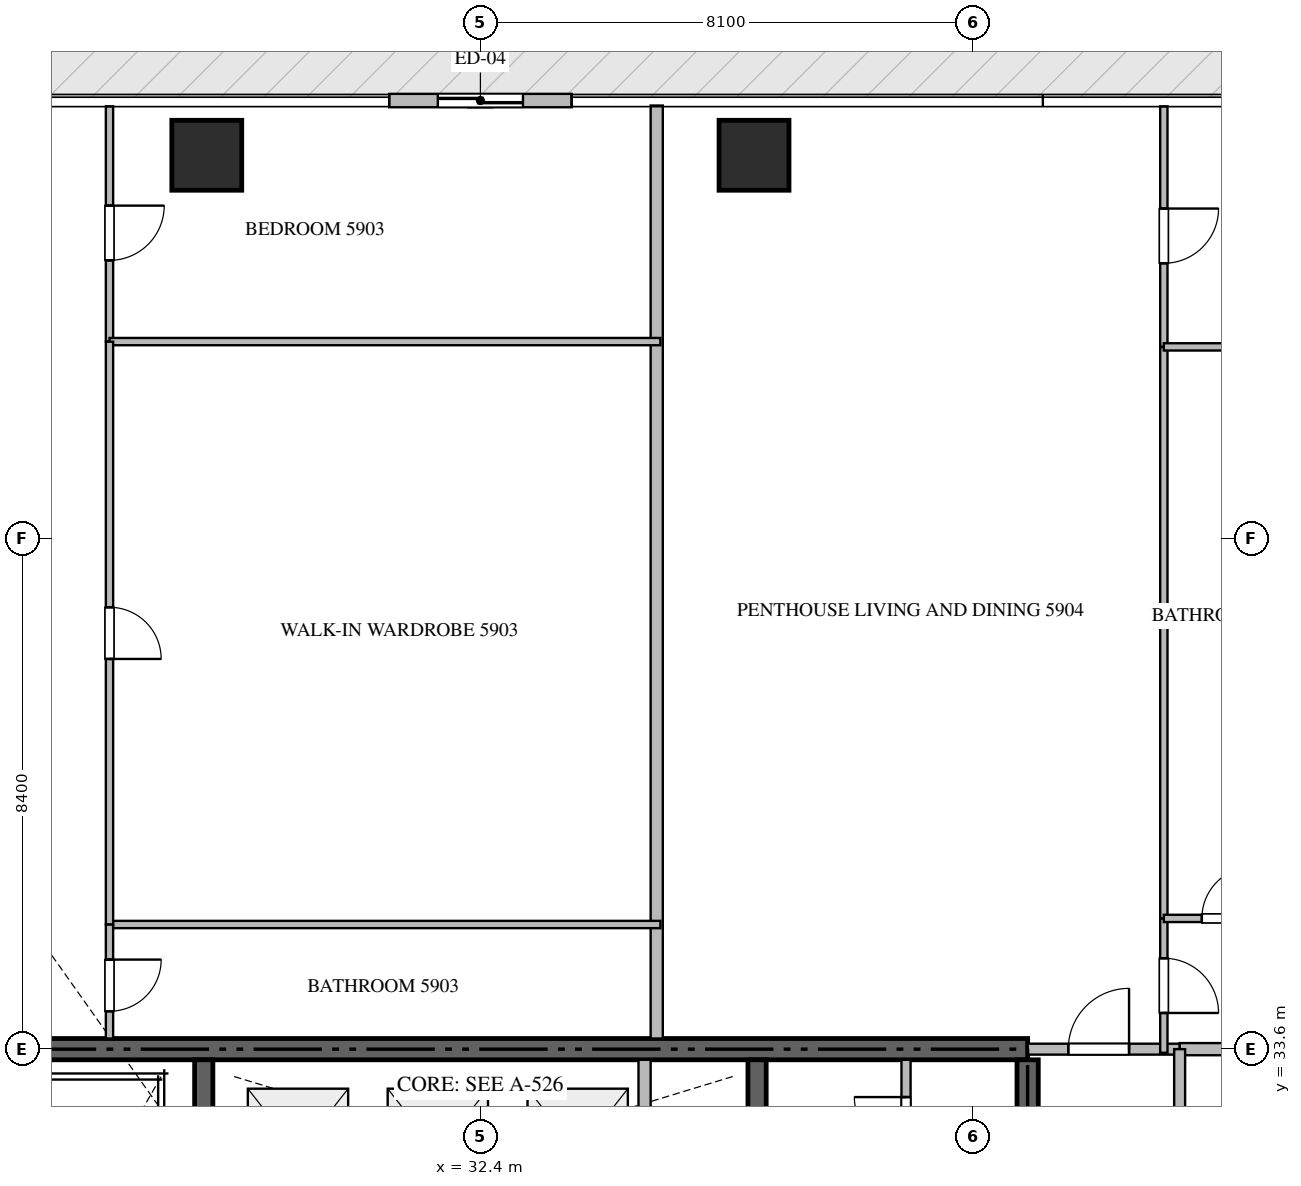
"""IFC4 building model, lengths in metres.
Left out: names, types, materials, properties, quantities, classifications, styles, units other than length and angle.
Written with IfcOpenShell. Run it as: python <this file> out.ifc"""

import sys

from ifc_helpers import new_model, si_unit, direction, frame, frame_2d, origin, origin_2d, place, context, subcontext, project, spatial, rectangle, extrude, source, transform, mapped, element, fill, save


model = new_model("IFC4")
c1 = context("Model", 3, precision=1e-05, world=origin(), true_north=direction((0.0, 1.0)))
c2 = subcontext(c1, "Body", "Model", "MODEL_VIEW")
j1 = project(units=[si_unit("LENGTHUNIT", "METRE"), si_unit("PLANEANGLEUNIT", "RADIAN")], contexts=[c1])
p1 = place(None, origin())
s1 = spatial("IfcSite", under=j1, at=p1, CompositionType="ELEMENT")
p2 = place(p1, origin())
s2 = spatial("IfcBuilding", under=s1, at=p2, CompositionType="ELEMENT")
p3 = place(p2, frame((0.0, 0.0, 237.4)))
s3 = spatial("IfcBuildingStorey", under=s2, at=p3, CompositionType="ELEMENT", Elevation=237.4)
p4 = place(p3, frame((41.4, 33.6, -0.26), z_axis=(0.0, 0.0, 1.0), x_axis=(-1.0, 0.0, 0.0)))
e1 = element("IfcWall", 1, at=p4, inside=s3, PredefinedType="SHEAR", context=c2, shape_type="SweptSolid", body=[
    extrude(rectangle(XDim=18.0, YDim=0.35, at=frame_2d((9.0, 0.0))), origin(), (0.0, 0.0, 1.0), 3.848),
])
p5 = place(p3, frame((41.4, 27.75, -0.26), z_axis=(0.0, 0.0, 1.0), x_axis=(0.0, 1.0, 0.0)))
e2 = element("IfcWall", 2, at=p5, inside=s3, PredefinedType="SHEAR", context=c2, shape_type="SweptSolid", body=[
    extrude(rectangle(XDim=5.675, YDim=0.35, at=frame_2d((2.837, 0.0))), origin(), (0.0, 0.0, 1.0), 3.848),
])
p6 = place(p3, frame((27.85, 23.55, -0.26), z_axis=(0.0, 0.0, 1.0), x_axis=(0.0, 1.0, 0.0)))
e3 = element("IfcWall", 3, at=p6, inside=s3, PredefinedType="SHEAR", context=c2, shape_type="SweptSolid", body=[
    extrude(rectangle(XDim=9.875, YDim=0.3, at=frame_2d((4.938, 0.0))), origin(), (0.0, 0.0, 1.0), 3.848),
])
p7 = place(p3, frame((36.95, 27.05, -0.26), z_axis=(0.0, 0.0, 1.0), x_axis=(0.0, 1.0, 0.0)))
e4 = element("IfcWall", 4, at=p7, inside=s3, PredefinedType="SHEAR", context=c2, shape_type="SweptSolid", body=[
    extrude(rectangle(XDim=6.375, YDim=0.3, at=frame_2d((3.188, 0.0))), origin(), (0.0, 0.0, 1.0), 3.848),
])
m1 = source(origin(), c2, "Body", "SweptSolid", [
    extrude(rectangle(XDim=1.15, YDim=1.15, at=origin_2d()), origin(), (0.0, 0.0, 1.0), 3.85),
])
for number, where, z_axis, x_axis in (
    (5, (27.9, 48.3, -0.26), (0.0, 0.0, 1.0), (1.0, 0.0, 0.0)),
    (6, (36.9, 48.3, -0.26), (0.0, 0.0, 1.0), (1.0, 0.0, 0.0)),
):
    element("IfcColumn", number, at=place(p3, frame(where, z_axis=z_axis, x_axis=x_axis)), inside=s3, PredefinedType="COLUMN", context=c2, shape_type="MappedRepresentation", body=[
        mapped(m1, transform((0.0, 0.0, 0.0), scale=1.0)),
    ])
p8 = place(p3, frame((33.9, 49.2, 0.0), z_axis=(0.0, 0.0, 1.0), x_axis=(-1.0, 0.0, 0.0)))
e7 = element("IfcWall", 7, at=p8, inside=s3, PredefinedType="ELEMENTEDWALL", context=c2, shape_type="SweptSolid", body=[
    extrude(rectangle(XDim=3.0, YDim=0.22, at=frame_2d((1.5, 0.0))), origin(), (0.0, 0.0, 1.0), 3.575),
])
p9 = place(p8, frame((0.8, 0.0, 0.0)))
e8 = element("IfcOpeningElement", 8, at=p9, cuts=e7, PredefinedType="OPENING", context=c2, shape_type="SweptSolid", body=[
    extrude(rectangle(XDim=1.4, YDim=2.25, at=frame_2d((0.7, 1.125))), frame((0.0, 0.12, 0.0), z_axis=(0.0, -1.0, 0.0), x_axis=(1.0, 0.0, 0.0)), (0.0, 0.0, 1.0), 0.24),
])
p10 = place(p3, frame((35.1, 30.75, 0.0), z_axis=(0.0, 0.0, 1.0), x_axis=(0.0, 1.0, 0.0)))
e9 = element("IfcWall", 9, at=p10, inside=s3, PredefinedType="STANDARD", context=c2, shape_type="SweptSolid", body=[
    extrude(rectangle(XDim=2.675, YDim=0.2, at=frame_2d((1.337, 0.0))), origin(), (0.0, 0.0, 1.0), 3.59),
])
p11 = place(p3, frame((39.4, 31.35, 0.0), z_axis=(0.0, 0.0, 1.0), x_axis=(0.0, 1.0, 0.0)))
e10 = element("IfcWall", 10, at=p11, inside=s3, PredefinedType="PARTITIONING", context=c2, shape_type="SweptSolid", body=[
    extrude(rectangle(XDim=2.075, YDim=0.15, at=frame_2d((1.038, 0.0))), origin(), (0.0, 0.0, 1.0), 3.59),
])
p12 = place(p11, frame((0.612, 0.0, 0.0)))
e11 = element("IfcOpeningElement", 11, at=p12, cuts=e10, PredefinedType="OPENING", context=c2, shape_type="SweptSolid", body=[
    extrude(rectangle(XDim=0.85, YDim=2.1, at=frame_2d((0.425, 1.05))), frame((0.0, 0.085, 0.0), z_axis=(0.0, -1.0, 0.0), x_axis=(1.0, 0.0, 0.0)), (0.0, 0.0, 1.0), 0.17),
])
p13 = place(p3, frame((35.3, 33.775, 0.0), z_axis=(0.0, 0.0, 1.0), x_axis=(0.0, 1.0, 0.0)))
e12 = element("IfcWall", 12, at=p13, inside=s3, PredefinedType="PARTITIONING", context=c2, shape_type="SweptSolid", body=[
    extrude(rectangle(XDim=15.343, YDim=0.2, at=frame_2d((7.671, 0.0))), origin(), (0.0, 0.0, 1.0), 3.59),
])
p14 = place(p3, frame((43.9, 33.6, 0.0), z_axis=(0.0, 0.0, 1.0), x_axis=(1.0, 0.0, 0.0)))
e13 = element("IfcWall", 13, at=p14, inside=s3, PredefinedType="PARTITIONING", context=c2, shape_type="SweptSolid", body=[
    extrude(rectangle(XDim=13.418, YDim=0.2, at=frame_2d((6.709, 0.0))), origin(), (0.0, 0.0, 1.0), 3.59),
])
p15 = place(p3, frame((41.402, 33.6, 0.0), z_axis=(0.0, 0.0, 1.0), x_axis=(1.0, 0.0, 0.0)))
e14 = element("IfcWall", 14, at=p15, inside=s3, PredefinedType="PARTITIONING", context=c2, shape_type="SweptSolid", body=[
    extrude(rectangle(XDim=2.496, YDim=0.18, at=frame_2d((1.248, 0.0))), origin(), (0.0, 0.0, 1.0), 3.59),
])
p16 = place(p15, frame((0.666, 0.0, 0.0)))
e15 = element("IfcOpeningElement", 15, at=p16, cuts=e14, PredefinedType="OPENING", context=c2, shape_type="SweptSolid", body=[
    extrude(rectangle(XDim=1.0, YDim=2.15, at=frame_2d((0.5, 1.075))), frame((0.0, 0.1, 0.0), z_axis=(0.0, -1.0, 0.0), x_axis=(1.0, 0.0, 0.0)), (0.0, 0.0, 1.0), 0.2),
])
p17 = place(p3, frame((43.9, 16.8, 0.0), z_axis=(0.0, 0.0, 1.0), x_axis=(0.0, 1.0, 0.0)))
e16 = element("IfcWall", 16, at=p17, inside=s3, PredefinedType="PARTITIONING", context=c2, shape_type="SweptSolid", body=[
    extrude(rectangle(XDim=16.8, YDim=0.18, at=frame_2d((8.4, 0.0))), origin(), (0.0, 0.0, 1.0), 3.59),
])
p18 = place(p17, frame((4.693, 0.0, 0.0)))
e17 = element("IfcOpeningElement", 17, at=p18, cuts=e16, PredefinedType="OPENING", context=c2, shape_type="SweptSolid", body=[
    extrude(rectangle(XDim=1.0, YDim=2.15, at=frame_2d((0.5, 1.075))), frame((0.0, 0.1, 0.0), z_axis=(0.0, -1.0, 0.0), x_axis=(1.0, 0.0, 0.0)), (0.0, 0.0, 1.0), 0.2),
])
p19 = place(p17, frame((13.13, 0.0, 0.0)))
e18 = element("IfcOpeningElement", 18, at=p19, cuts=e16, PredefinedType="OPENING", context=c2, shape_type="SweptSolid", body=[
    extrude(rectangle(XDim=1.0, YDim=2.15, at=frame_2d((0.5, 1.075))), frame((0.0, 0.1, 0.0), z_axis=(0.0, -1.0, 0.0), x_axis=(1.0, 0.0, 0.0)), (0.0, 0.0, 1.0), 0.2),
])
p20 = place(p3, frame((26.3, 49.105, 0.0), z_axis=(0.0, 0.0, 1.0), x_axis=(0.0, -1.0, 0.0)))
e19 = element("IfcWall", 19, at=p20, inside=s3, PredefinedType="PARTITIONING", context=c2, shape_type="SweptSolid", body=[
    extrude(rectangle(XDim=3.869, YDim=0.12, at=frame_2d((1.935, 0.0))), origin(), (0.0, 0.0, 1.0), 3.59),
])
p21 = place(p20, frame((1.633, 0.0, 0.0)))
e20 = element("IfcOpeningElement", 20, at=p21, cuts=e19, PredefinedType="OPENING", context=c2, shape_type="SweptSolid", body=[
    extrude(rectangle(XDim=0.9, YDim=2.1, at=frame_2d((0.45, 1.05))), frame((0.0, 0.07, 0.0), z_axis=(0.0, -1.0, 0.0), x_axis=(1.0, 0.0, 0.0)), (0.0, 0.0, 1.0), 0.14),
])
for number, where, z_axis, x_axis in (
    (21, (26.3, 45.236, 0.0), (0.0, 0.0, 1.0), (1.0, 0.0, 0.0)),
    (22, (26.3, 35.65, 0.0), (0.0, 0.0, 1.0), (1.0, 0.0, 0.0)),
):
    element("IfcWall", number, at=place(p3, frame(where, z_axis=z_axis, x_axis=x_axis)), inside=s3, PredefinedType="PARTITIONING", context=c2, shape_type="SweptSolid", body=[
        extrude(rectangle(XDim=9.06, YDim=0.12, at=frame_2d((4.53, 0.0))), origin(), (0.0, 0.0, 1.0), 3.59),
    ])
p22 = place(p3, frame((26.3, 45.234, 0.0), z_axis=(0.0, 0.0, 1.0), x_axis=(0.0, -1.0, 0.0)))
e23 = element("IfcWall", 23, at=p22, inside=s3, PredefinedType="PARTITIONING", context=c2, shape_type="SweptSolid", body=[
    extrude(rectangle(XDim=9.584, YDim=0.12, at=frame_2d((4.792, 0.0))), origin(), (0.0, 0.0, 1.0), 3.59),
])
p23 = place(p22, frame((4.367, 0.0, 0.0)))
e24 = element("IfcOpeningElement", 24, at=p23, cuts=e23, PredefinedType="OPENING", context=c2, shape_type="SweptSolid", body=[
    extrude(rectangle(XDim=0.85, YDim=2.1, at=frame_2d((0.425, 1.05))), frame((0.0, 0.07, 0.0), z_axis=(0.0, -1.0, 0.0), x_axis=(1.0, 0.0, 0.0)), (0.0, 0.0, 1.0), 0.14),
])
p24 = place(p3, frame((26.3, 35.648, 0.0), z_axis=(0.0, 0.0, 1.0), x_axis=(0.0, -1.0, 0.0)))
e25 = element("IfcWall", 25, at=p24, inside=s3, PredefinedType="PARTITIONING", context=c2, shape_type="SweptSolid", body=[
    extrude(rectangle(XDim=1.873, YDim=0.12, at=frame_2d((0.937, 0.0))), origin(), (0.0, 0.0, 1.0), 3.59),
])
p25 = place(p24, frame((0.575, 0.0, 0.0)))
e26 = element("IfcOpeningElement", 26, at=p25, cuts=e25, PredefinedType="OPENING", context=c2, shape_type="SweptSolid", body=[
    extrude(rectangle(XDim=0.85, YDim=2.1, at=frame_2d((0.425, 1.05))), frame((0.0, 0.07, 0.0), z_axis=(0.0, -1.0, 0.0), x_axis=(1.0, 0.0, 0.0)), (0.0, 0.0, 1.0), 0.14),
])
p26 = place(p3, frame((43.64, 35.75, 0.0), z_axis=(0.0, 0.0, 1.0), x_axis=(0.0, -1.0, 0.0)))
e27 = element("IfcWall", 27, at=p26, inside=s3, PredefinedType="PARTITIONING", context=c2, shape_type="SweptSolid", body=[
    extrude(rectangle(XDim=2.21, YDim=0.12, at=frame_2d((1.105, 0.0))), origin(), (0.0, 0.0, 1.0), 3.59),
])
p27 = place(p26, frame((0.655, 0.0, 0.0)))
e28 = element("IfcOpeningElement", 28, at=p27, cuts=e27, PredefinedType="OPENING", context=c2, shape_type="SweptSolid", body=[
    extrude(rectangle(XDim=0.9, YDim=2.1, at=frame_2d((0.45, 1.05))), frame((0.0, 0.07, 0.0), z_axis=(0.0, -1.0, 0.0), x_axis=(1.0, 0.0, 0.0)), (0.0, 0.0, 1.0), 0.14),
])
p28 = place(p3, frame((43.64, 49.105, 0.0), z_axis=(0.0, 0.0, 1.0), x_axis=(0.0, -1.0, 0.0)))
e29 = element("IfcWall", 29, at=p28, inside=s3, PredefinedType="PARTITIONING", context=c2, shape_type="SweptSolid", body=[
    extrude(rectangle(XDim=3.956, YDim=0.12, at=frame_2d((1.978, 0.0))), origin(), (0.0, 0.0, 1.0), 3.59),
])
p29 = place(p28, frame((1.681, 0.0, 0.0)))
e30 = element("IfcOpeningElement", 30, at=p29, cuts=e29, PredefinedType="OPENING", context=c2, shape_type="SweptSolid", body=[
    extrude(rectangle(XDim=0.9, YDim=2.1, at=frame_2d((0.45, 1.05))), frame((0.0, 0.07, 0.0), z_axis=(0.0, -1.0, 0.0), x_axis=(1.0, 0.0, 0.0)), (0.0, 0.0, 1.0), 0.14),
])
p30 = place(p3, frame((43.64, 45.147, 0.0), z_axis=(0.0, 0.0, 1.0), x_axis=(0.0, -1.0, 0.0)))
e31 = element("IfcWall", 31, at=p30, inside=s3, PredefinedType="PARTITIONING", context=c2, shape_type="SweptSolid", body=[
    extrude(rectangle(XDim=9.395, YDim=0.12, at=frame_2d((4.698, 0.0))), origin(), (0.0, 0.0, 1.0), 3.59),
])
p31 = place(p3, frame((43.64, 45.149, 0.0), z_axis=(0.0, 0.0, 1.0), x_axis=(1.0, 0.0, 0.0)))
e32 = element("IfcWall", 32, at=p31, inside=s3, PredefinedType="PARTITIONING", context=c2, shape_type="SweptSolid", body=[
    extrude(rectangle(XDim=5.15, YDim=0.12, at=frame_2d((2.575, 0.0))), origin(), (0.0, 0.0, 1.0), 3.59),
])
p32 = place(p3, frame((43.64, 35.75, 0.0), z_axis=(0.0, 0.0, 1.0), x_axis=(1.0, 0.0, 0.0)))
e33 = element("IfcWall", 33, at=p32, inside=s3, PredefinedType="PARTITIONING", context=c2, shape_type="SweptSolid", body=[
    extrude(rectangle(XDim=2.1, YDim=0.12, at=frame_2d((1.05, 0.0))), origin(), (0.0, 0.0, 1.0), 3.59),
])
p33 = place(p32, frame((0.625, 0.0, 0.0)))
e34 = element("IfcOpeningElement", 34, at=p33, cuts=e33, PredefinedType="OPENING", context=c2, shape_type="SweptSolid", body=[
    extrude(rectangle(XDim=0.85, YDim=2.1, at=frame_2d((0.425, 1.05))), frame((0.0, 0.07, 0.0), z_axis=(0.0, -1.0, 0.0), x_axis=(1.0, 0.0, 0.0)), (0.0, 0.0, 1.0), 0.14),
])
m2 = source(origin(), c2, "Body", "SweptSolid", [
    extrude(rectangle(XDim=1.4, YDim=2.25, at=frame_2d((0.7, 1.125))), frame((0.0, 0.025, 0.0), z_axis=(0.0, -1.0, 0.0), x_axis=(1.0, 0.0, 0.0)), (0.0, 0.0, 1.0), 0.05),
])
p34 = place(p9, origin())
e35 = element("IfcDoor", 35, at=p34, inside=s3, OperationType="SLIDING_TO_LEFT", PredefinedType="DOOR", context=c2, shape_type="MappedRepresentation", body=[
    mapped(m2, transform((0.0, 0.0, 0.0), scale=1.0)),
])
fill(e8, e35)
m3 = source(origin(), c2, "Body", "SweptSolid", [
    extrude(rectangle(XDim=0.85, YDim=2.1, at=frame_2d((0.425, 1.05))), frame((0.0, 0.025, 0.0), z_axis=(0.0, -1.0, 0.0), x_axis=(1.0, 0.0, 0.0)), (0.0, 0.0, 1.0), 0.05),
])
p35 = place(p12, origin())
e36 = element("IfcDoor", 36, at=p35, inside=s3, OperationType="SINGLE_SWING_RIGHT", PredefinedType="DOOR", context=c2, shape_type="MappedRepresentation", body=[
    mapped(m3, transform((0.0, 0.0, 0.0), scale=1.0)),
])
fill(e11, e36)
m4 = source(origin(), c2, "Body", "SweptSolid", [
    extrude(rectangle(XDim=1.0, YDim=2.15, at=frame_2d((0.5, 1.075))), frame((0.0, 0.025, 0.0), z_axis=(0.0, -1.0, 0.0), x_axis=(1.0, 0.0, 0.0)), (0.0, 0.0, 1.0), 0.05),
])
p36 = place(p16, origin())
e37 = element("IfcDoor", 37, at=p36, inside=s3, OperationType="SINGLE_SWING_RIGHT", PredefinedType="DOOR", context=c2, shape_type="MappedRepresentation", body=[
    mapped(m4, transform((0.0, 0.0, 0.0), scale=1.0)),
])
fill(e15, e37)
m5 = source(origin(), c2, "Body", "SweptSolid", [
    extrude(rectangle(XDim=0.9, YDim=2.1, at=frame_2d((0.45, 1.05))), frame((0.0, 0.025, 0.0), z_axis=(0.0, -1.0, 0.0), x_axis=(1.0, 0.0, 0.0)), (0.0, 0.0, 1.0), 0.05),
])
p37 = place(p21, origin())
e38 = element("IfcDoor", 38, at=p37, inside=s3, OperationType="SINGLE_SWING_LEFT", PredefinedType="DOOR", context=c2, shape_type="MappedRepresentation", body=[
    mapped(m5, transform((0.0, 0.0, 0.0), scale=1.0)),
])
fill(e20, e38)
p38 = place(p23, origin())
e39 = element("IfcDoor", 39, at=p38, inside=s3, OperationType="SINGLE_SWING_RIGHT", PredefinedType="DOOR", context=c2, shape_type="MappedRepresentation", body=[
    mapped(m3, transform((0.0, 0.0, 0.0), scale=1.0)),
])
fill(e24, e39)
p39 = place(p25, origin())
e40 = element("IfcDoor", 40, at=p39, inside=s3, OperationType="SINGLE_SWING_LEFT", PredefinedType="DOOR", context=c2, shape_type="MappedRepresentation", body=[
    mapped(m3, transform((0.0, 0.0, 0.0), scale=1.0)),
])
fill(e26, e40)
p40 = place(p27, origin())
e41 = element("IfcDoor", 41, at=p40, inside=s3, OperationType="SINGLE_SWING_RIGHT", PredefinedType="DOOR", context=c2, shape_type="MappedRepresentation", body=[
    mapped(m5, transform((0.0, 0.0, 0.0), scale=1.0)),
])
fill(e28, e41)
p41 = place(p29, origin())
e42 = element("IfcDoor", 42, at=p41, inside=s3, OperationType="SINGLE_SWING_LEFT", PredefinedType="DOOR", context=c2, shape_type="MappedRepresentation", body=[
    mapped(m5, transform((0.0, 0.0, 0.0), scale=1.0)),
])
fill(e30, e42)
p42 = place(p33, origin())
e43 = element("IfcDoor", 43, at=p42, inside=s3, OperationType="SINGLE_SWING_RIGHT", PredefinedType="DOOR", context=c2, shape_type="MappedRepresentation", body=[
    mapped(m3, transform((0.0, 0.0, 0.0), scale=1.0)),
])
fill(e34, e43)
save(model, sys.argv[1])
